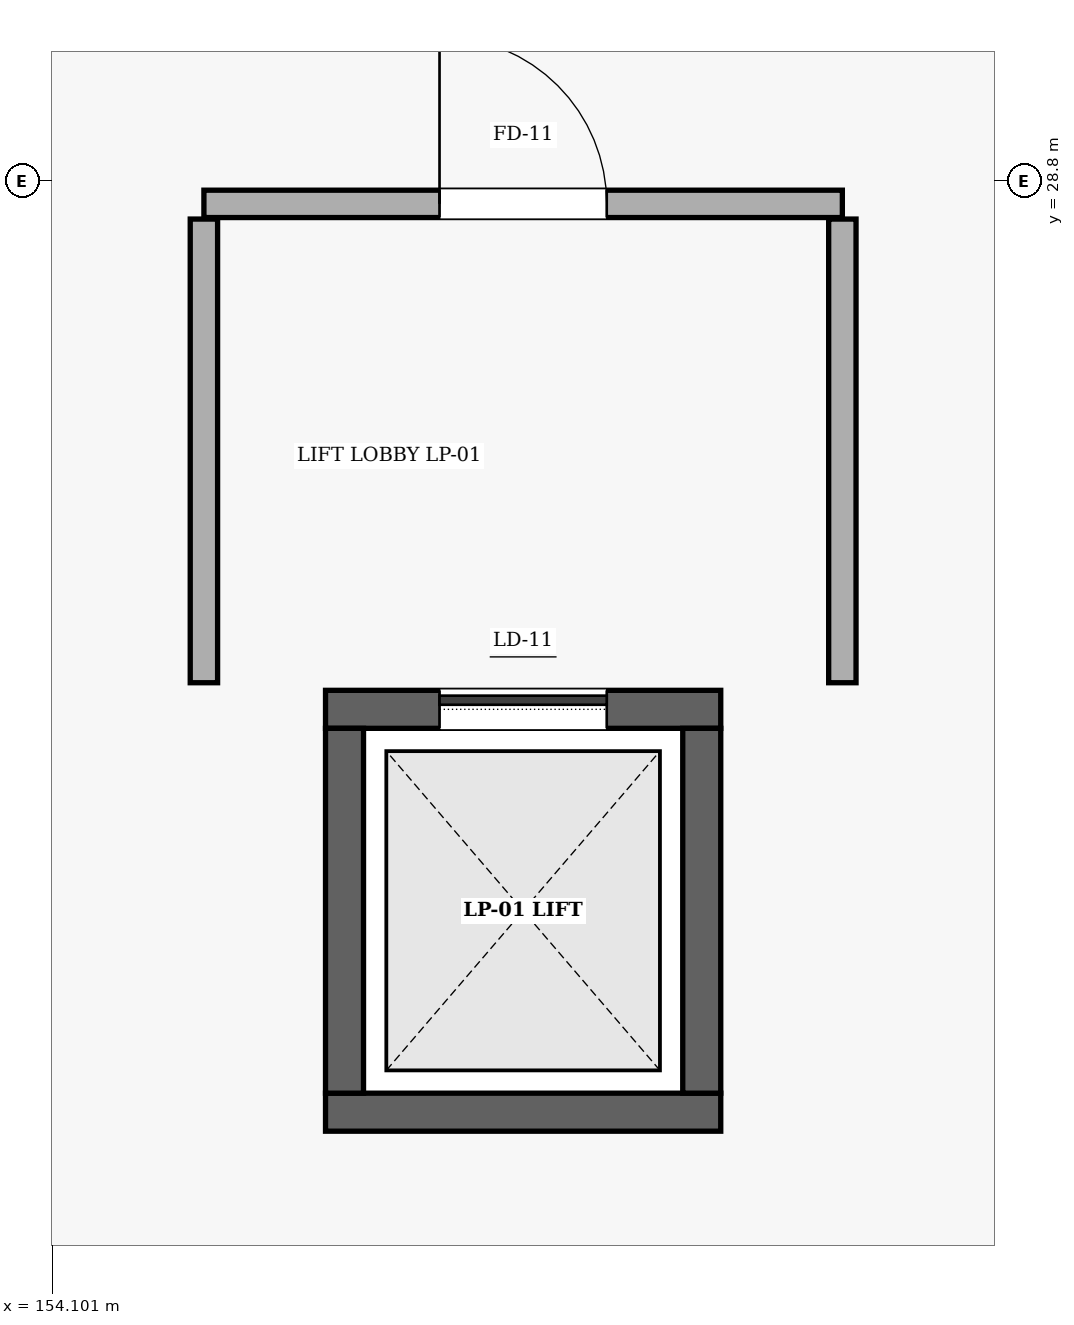
"""IFC4 building model, lengths in metres.
Left out: names, types, materials, properties, quantities, classifications, styles, units other than length and angle.
Written with IfcOpenShell. Run it as: python <this file> out.ifc"""

import sys

from ifc_helpers import new_model, si_unit, direction, frame, frame_2d, origin, place, context, subcontext, project, spatial, rectangle, extrude, element, fill, save


model = new_model("IFC4")
c1 = context("Model", 3, precision=1e-05, world=origin(), true_north=direction((0.0, 1.0)))
c2 = subcontext(c1, "Body", "Model", "MODEL_VIEW")
j1 = project(units=[si_unit("LENGTHUNIT", "METRE"), si_unit("PLANEANGLEUNIT", "RADIAN")], contexts=[c1])
p1 = place(None, origin())
s1 = spatial("IfcSite", under=j1, at=p1, CompositionType="ELEMENT")
p2 = place(p1, origin())
s2 = spatial("IfcBuilding", under=s1, at=p2, CompositionType="ELEMENT")
p3 = place(p2, origin())
s3 = spatial("IfcBuildingStorey", under=s2, at=p3, CompositionType="ELEMENT", Elevation=0.0)
p4 = place(p3, frame((155.9, 22.675, 0.0), z_axis=(0.0, 0.0, 1.0), x_axis=(1.0, 0.0, 0.0)))
e1 = element("IfcWall", 1, at=p4, inside=s3, PredefinedType="SHEAR", context=c2, shape_type="SweptSolid", body=[
    extrude(rectangle(XDim=2.6, YDim=0.25, at=frame_2d((1.3, 0.0))), origin(), (0.0, 0.0, 1.0), 5.12),
])
p5 = place(p3, frame((155.9, 25.325, 0.0), z_axis=(0.0, 0.0, 1.0), x_axis=(1.0, 0.0, 0.0)))
e2 = element("IfcWall", 2, at=p5, inside=s3, PredefinedType="SHEAR", context=c2, shape_type="SweptSolid", body=[
    extrude(rectangle(XDim=2.6, YDim=0.25, at=frame_2d((1.3, 0.0))), origin(), (0.0, 0.0, 1.0), 5.12),
])
p6 = place(p5, frame((0.75, 0.0, 0.0)))
e3 = element("IfcOpeningElement", 3, at=p6, cuts=e2, PredefinedType="OPENING", context=c2, shape_type="SweptSolid", body=[
    extrude(rectangle(XDim=1.1, YDim=2.15, at=frame_2d((0.55, 1.075))), frame((0.0, 0.135, 0.0), z_axis=(0.0, -1.0, 0.0), x_axis=(1.0, 0.0, 0.0)), (0.0, 0.0, 1.0), 0.27),
])
for number, where, z_axis, x_axis in (
    (4, (156.025, 22.8, 0.0), (0.0, 0.0, 1.0), (0.0, 1.0, 0.0)),
    (5, (158.375, 22.8, 0.0), (0.0, 0.0, 1.0), (0.0, 1.0, 0.0)),
):
    element("IfcWall", number, at=place(p3, frame(where, z_axis=z_axis, x_axis=x_axis)), inside=s3, PredefinedType="SHEAR", context=c2, shape_type="SweptSolid", body=[
        extrude(rectangle(XDim=2.4, YDim=0.25, at=frame_2d((1.2, 0.0))), origin(), (0.0, 0.0, 1.0), 5.12),
    ])
p7 = place(p3, frame((155.1, 28.65, 0.0), z_axis=(0.0, 0.0, 1.0), x_axis=(1.0, 0.0, 0.0)))
e6 = element("IfcWall", 6, at=p7, inside=s3, PredefinedType="PARTITIONING", context=c2, shape_type="SweptSolid", body=[
    extrude(rectangle(XDim=4.2, YDim=0.18, at=frame_2d((2.1, 0.0))), origin(), (0.0, 0.0, 1.0), 4.205),
])
p8 = place(p7, frame((1.55, 0.0, 0.0)))
e7 = element("IfcOpeningElement", 7, at=p8, cuts=e6, PredefinedType="OPENING", context=c2, shape_type="SweptSolid", body=[
    extrude(rectangle(XDim=1.1, YDim=2.15, at=frame_2d((0.55, 1.075))), frame((0.0, 0.1, 0.0), z_axis=(0.0, -1.0, 0.0), x_axis=(1.0, 0.0, 0.0)), (0.0, 0.0, 1.0), 0.2),
])
for number, where, z_axis, x_axis in (
    (8, (155.1, 25.5, 0.0), (0.0, 0.0, 1.0), (0.0, 1.0, 0.0)),
    (9, (159.3, 25.5, 0.0), (0.0, 0.0, 1.0), (0.0, 1.0, 0.0)),
):
    element("IfcWall", number, at=place(p3, frame(where, z_axis=z_axis, x_axis=x_axis)), inside=s3, PredefinedType="PARTITIONING", context=c2, shape_type="SweptSolid", body=[
        extrude(rectangle(XDim=3.05, YDim=0.18, at=frame_2d((1.525, 0.0))), origin(), (0.0, 0.0, 1.0), 4.205),
    ])
p9 = place(p6, origin())
e10 = element("IfcDoor", 10, at=p9, inside=s3, OperationType="SLIDING_TO_LEFT", PredefinedType="DOOR", context=c2, shape_type="SweptSolid", body=[
    extrude(rectangle(XDim=1.1, YDim=2.15, at=frame_2d((0.55, 1.075))), frame((0.0, 0.025, 0.0), z_axis=(0.0, -1.0, 0.0), x_axis=(1.0, 0.0, 0.0)), (0.0, 0.0, 1.0), 0.05),
])
fill(e3, e10)
p10 = place(p8, origin())
e11 = element("IfcDoor", 11, at=p10, inside=s3, OperationType="SINGLE_SWING_LEFT", PredefinedType="DOOR", context=c2, shape_type="SweptSolid", body=[
    extrude(rectangle(XDim=1.1, YDim=2.15, at=frame_2d((0.55, 1.075))), frame((0.0, 0.025, 0.0), z_axis=(0.0, -1.0, 0.0), x_axis=(1.0, 0.0, 0.0)), (0.0, 0.0, 1.0), 0.05),
])
fill(e7, e11)
save(model, sys.argv[1])
